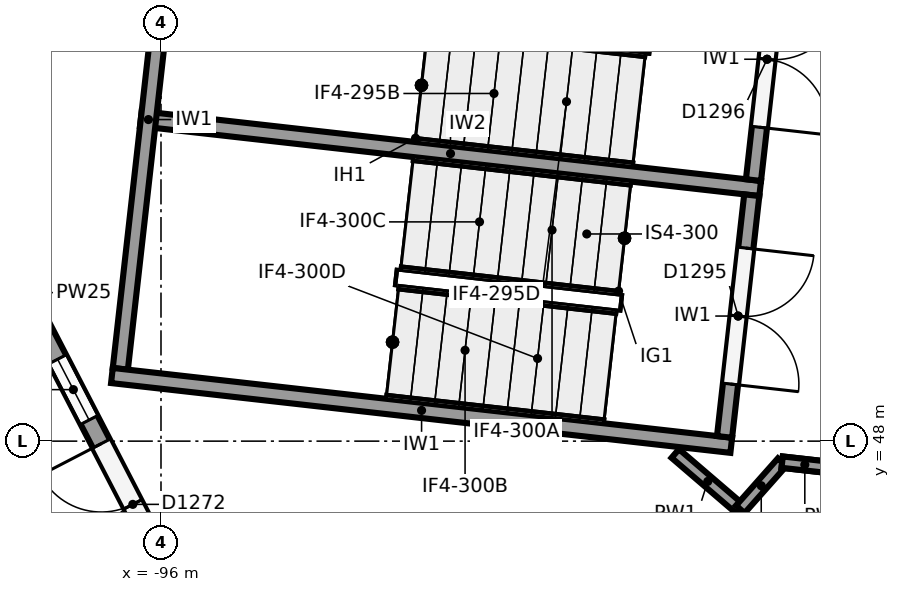
"""IFC4 building model, lengths in metres.
Left out: names, types, materials, properties, quantities, classifications, styles, units other than length and angle.
Written with IfcOpenShell. Run it as: python <this file> out.ifc"""

import sys

from ifc_helpers import new_model, si_unit, direction, frame, frame_2d, origin, place, context, subcontext, project, spatial, rectangle, extrude, element, fill, save


model = new_model("IFC4")
c1 = context("Model", 3, precision=1e-05, world=origin(), true_north=direction((0.0, 1.0)))
c2 = subcontext(c1, "Body", "Model", "MODEL_VIEW")
j1 = project(units=[si_unit("LENGTHUNIT", "METRE"), si_unit("PLANEANGLEUNIT", "RADIAN")], contexts=[c1])
p1 = place(None, origin())
s1 = spatial("IfcSite", under=j1, at=p1, CompositionType="ELEMENT")
p2 = place(p1, origin())
s2 = spatial("IfcBuilding", under=s1, at=p2, CompositionType="ELEMENT")
p3 = place(p2, frame((0.0, 0.0, 18.0)))
s3 = spatial("IfcBuildingStorey", under=s2, at=p3, CompositionType="ELEMENT", Elevation=18.0)
p4 = place(p3, frame((-94.807, 44.149, 0.0), z_axis=(0.0, 0.0, 1.0), x_axis=(-0.460021193284, 0.887907935391, 0.0)))
e1 = element("IfcWall", 1, at=p4, inside=s3, PredefinedType="SOLIDWALL", context=c2, shape_type="SweptSolid", body=[
    extrude(rectangle(XDim=13.075, YDim=0.25, at=frame_2d((6.538, 0.0))), origin(), (0.0, 0.0, 1.0), 4.3),
])
p5 = place(p4, frame((0.75, 0.0, 1.0)))
e2 = element("IfcOpeningElement", 2, at=p5, cuts=e1, PredefinedType="OPENING", context=c2, shape_type="SweptSolid", body=[
    extrude(rectangle(XDim=0.9, YDim=3.25, at=frame_2d((0.45, 1.625))), frame((0.0, 0.135, 0.0), z_axis=(0.0, -1.0, 0.0), x_axis=(1.0, 0.0, 0.0)), (0.0, 0.0, 1.0), 0.27),
])
p6 = place(p4, frame((4.65, 0.0, 1.0)))
e3 = element("IfcOpeningElement", 3, at=p6, cuts=e1, PredefinedType="OPENING", context=c2, shape_type="SweptSolid", body=[
    extrude(rectangle(XDim=0.9, YDim=3.25, at=frame_2d((0.45, 1.625))), frame((0.0, 0.135, 0.0), z_axis=(0.0, -1.0, 0.0), x_axis=(1.0, 0.0, 0.0)), (0.0, 0.0, 1.0), 0.27),
])
p7 = place(p4, frame((11.25, 0.0, 1.0)))
e4 = element("IfcOpeningElement", 4, at=p7, cuts=e1, PredefinedType="OPENING", context=c2, shape_type="SweptSolid", body=[
    extrude(rectangle(XDim=0.9, YDim=3.25, at=frame_2d((0.45, 1.625))), frame((0.0, 0.135, 0.0), z_axis=(0.0, -1.0, 0.0), x_axis=(1.0, 0.0, 0.0)), (0.0, 0.0, 1.0), 0.27),
])
p8 = place(p4, frame((2.5, 0.0, 0.0)))
e5 = element("IfcOpeningElement", 5, at=p8, cuts=e1, PredefinedType="OPENING", context=c2, shape_type="SweptSolid", body=[
    extrude(rectangle(XDim=1.8, YDim=2.4, at=frame_2d((0.9, 1.2))), frame((0.0, 0.135, 0.0), z_axis=(0.0, -1.0, 0.0), x_axis=(1.0, 0.0, 0.0)), (0.0, 0.0, 1.0), 0.27),
])
p9 = place(p3, frame((-96.646, 48.863, 0.0), z_axis=(0.0, 0.0, 1.0), x_axis=(0.993714104693, -0.111947658007, 0.0)))
e6 = element("IfcWall", 6, at=p9, inside=s3, PredefinedType="SHEAR", context=c2, shape_type="SweptSolid", body=[
    extrude(rectangle(XDim=8.2, YDim=0.2, at=frame_2d((4.1, 0.0))), origin(), (0.0, 0.0, 1.0), 5.6),
])
p10 = place(p3, frame((-95.796, 55.51, 0.0), z_axis=(0.0, 0.0, 1.0), x_axis=(-0.111970106426, -0.993711575492, 0.0)))
e7 = element("IfcWall", 7, at=p10, inside=s3, PredefinedType="SHEAR", context=c2, shape_type="SweptSolid", body=[
    extrude(rectangle(XDim=6.6, YDim=0.2, at=frame_2d((3.3, 0.0))), origin(), (0.0, 0.0, 1.0), 5.6),
])
p11 = place(p3, frame((-96.265, 52.242, 0.0), z_axis=(0.0, 0.0, 1.0), x_axis=(0.993713731549, -0.111950970206, 0.0)))
e8 = element("IfcWall", 8, at=p11, inside=s3, PredefinedType="SHEAR", context=c2, shape_type="SweptSolid", body=[
    extrude(rectangle(XDim=8.2, YDim=0.2, at=frame_2d((4.1, 0.0))), origin(), (0.0, 0.0, 1.0), 5.6),
])
p12 = place(p3, frame((-87.846, 54.614, 0.0), z_axis=(0.0, 0.0, 1.0), x_axis=(-0.112005735442, -0.993707560215, 0.0)))
e9 = element("IfcWall", 9, at=p12, inside=s3, PredefinedType="SHEAR", context=c2, shape_type="SweptSolid", body=[
    extrude(rectangle(XDim=3.2, YDim=0.2, at=frame_2d((1.6, 0.0))), origin(), (0.0, 0.0, 1.0), 5.6),
])
p13 = place(p12, frame((0.7, 0.0, 0.0)))
e10 = element("IfcOpeningElement", 10, at=p13, cuts=e9, PredefinedType="OPENING", context=c2, shape_type="SweptSolid", body=[
    extrude(rectangle(XDim=1.8, YDim=2.1, at=frame_2d((0.9, 1.05))), frame((0.0, 0.11, 0.0), z_axis=(0.0, -1.0, 0.0), x_axis=(1.0, 0.0, 0.0)), (0.0, 0.0, 1.0), 0.22),
])
p14 = place(p3, frame((-88.227, 51.236, 0.0), z_axis=(0.0, 0.0, 1.0), x_axis=(-0.111930393474, -0.993716049491, 0.0)))
e11 = element("IfcWall", 11, at=p14, inside=s3, PredefinedType="SHEAR", context=c2, shape_type="SweptSolid", body=[
    extrude(rectangle(XDim=3.2, YDim=0.2, at=frame_2d((1.6, 0.0))), origin(), (0.0, 0.0, 1.0), 5.6),
])
p15 = place(p14, frame((0.7, 0.0, 0.0)))
e12 = element("IfcOpeningElement", 12, at=p15, cuts=e11, PredefinedType="OPENING", context=c2, shape_type="SweptSolid", body=[
    extrude(rectangle(XDim=1.8, YDim=2.1, at=frame_2d((0.9, 1.05))), frame((0.0, 0.11, 0.0), z_axis=(0.0, -1.0, 0.0), x_axis=(1.0, 0.0, 0.0)), (0.0, 0.0, 1.0), 0.22),
])
p16 = place(p3, frame((-89.234, 47.837, 0.0), z_axis=(0.0, 0.0, 1.0), x_axis=(0.758950911089, -0.651147843855, 0.0)))
e13 = element("IfcWall", 13, at=p16, inside=s3, PredefinedType="PARTITIONING", context=c2, shape_type="SweptSolid", body=[
    extrude(rectangle(XDim=1.128, YDim=0.15, at=frame_2d((0.564, 0.0))), origin(), (0.0, 0.0, 1.0), 5.6),
])
p17 = place(p3, frame((-88.378, 47.103, 0.0), z_axis=(0.0, 0.0, 1.0), x_axis=(0.66330376879, 0.748350259109, 0.0)))
e14 = element("IfcWall", 14, at=p17, inside=s3, PredefinedType="PARTITIONING", context=c2, shape_type="SweptSolid", body=[
    extrude(rectangle(XDim=0.83, YDim=0.15, at=frame_2d((0.415, 0.0))), origin(), (0.0, 0.0, 1.0), 5.6),
])
p18 = place(p3, frame((-87.827, 47.724, 0.0), z_axis=(0.0, 0.0, 1.0), x_axis=(0.993708869306, -0.11199412066, 0.0)))
e15 = element("IfcWall", 15, at=p18, inside=s3, PredefinedType="PARTITIONING", context=c2, shape_type="SweptSolid", body=[
    extrude(rectangle(XDim=3.704, YDim=0.15, at=frame_2d((1.852, 0.0))), origin(), (0.0, 0.0, 1.0), 4.5),
])
p19 = place(p18, frame((0.65, 0.0, 0.0)))
e16 = element("IfcOpeningElement", 16, at=p19, cuts=e15, PredefinedType="OPENING", context=c2, shape_type="SweptSolid", body=[
    extrude(rectangle(XDim=1.8, YDim=2.1, at=frame_2d((0.9, 1.05))), frame((0.0, 0.085, 0.0), z_axis=(0.0, -1.0, 0.0), x_axis=(1.0, 0.0, 0.0)), (0.0, 0.0, 1.0), 0.17),
])
p20 = place(p3, frame((-87.827, 47.724, 4.5), z_axis=(0.0, 0.0, 1.0), x_axis=(0.993673547442, -0.112307083986, 0.0)))
e17 = element("IfcWall", 17, at=p20, inside=s3, PredefinedType="PARTITIONING", context=c2, shape_type="SweptSolid", body=[
    extrude(rectangle(XDim=0.6, YDim=0.15, at=frame_2d((0.3, 0.0))), origin(), (0.0, 0.0, 1.0), 1.1),
])
p21 = place(p6, origin())
e18 = element("IfcWindow", 18, at=p21, inside=s3, PartitioningType="SINGLE_PANEL", PredefinedType="WINDOW", context=c2, shape_type="SweptSolid", body=[
    extrude(rectangle(XDim=0.9, YDim=3.25, at=frame_2d((0.45, 1.625))), frame((0.0, 0.03, 0.0), z_axis=(0.0, -1.0, 0.0), x_axis=(1.0, 0.0, 0.0)), (0.0, 0.0, 1.0), 0.06),
])
fill(e3, e18)
p22 = place(p13, origin())
e19 = element("IfcDoor", 19, at=p22, inside=s3, OperationType="DOUBLE_DOOR_SINGLE_SWING", PredefinedType="DOOR", context=c2, shape_type="SweptSolid", body=[
    extrude(rectangle(XDim=1.8, YDim=2.1, at=frame_2d((0.9, 1.05))), frame((0.0, 0.025, 0.0), z_axis=(0.0, -1.0, 0.0), x_axis=(1.0, 0.0, 0.0)), (0.0, 0.0, 1.0), 0.05),
])
fill(e10, e19)
p23 = place(p15, origin())
e20 = element("IfcDoor", 20, at=p23, inside=s3, OperationType="DOUBLE_DOOR_SINGLE_SWING", PredefinedType="DOOR", context=c2, shape_type="SweptSolid", body=[
    extrude(rectangle(XDim=1.8, YDim=2.1, at=frame_2d((0.9, 1.05))), frame((0.0, 0.025, 0.0), z_axis=(0.0, -1.0, 0.0), x_axis=(1.0, 0.0, 0.0)), (0.0, 0.0, 1.0), 0.05),
])
fill(e12, e20)
p24 = place(p8, origin())
e21 = element("IfcDoor", 21, at=p24, inside=s3, OperationType="DOUBLE_DOOR_SINGLE_SWING", PredefinedType="DOOR", context=c2, shape_type="SweptSolid", body=[
    extrude(rectangle(XDim=1.8, YDim=2.4, at=frame_2d((0.9, 1.2))), frame((0.0, 0.025, 0.0), z_axis=(0.0, -1.0, 0.0), x_axis=(1.0, 0.0, 0.0)), (0.0, 0.0, 1.0), 0.05),
])
fill(e5, e21)
save(model, sys.argv[1])
